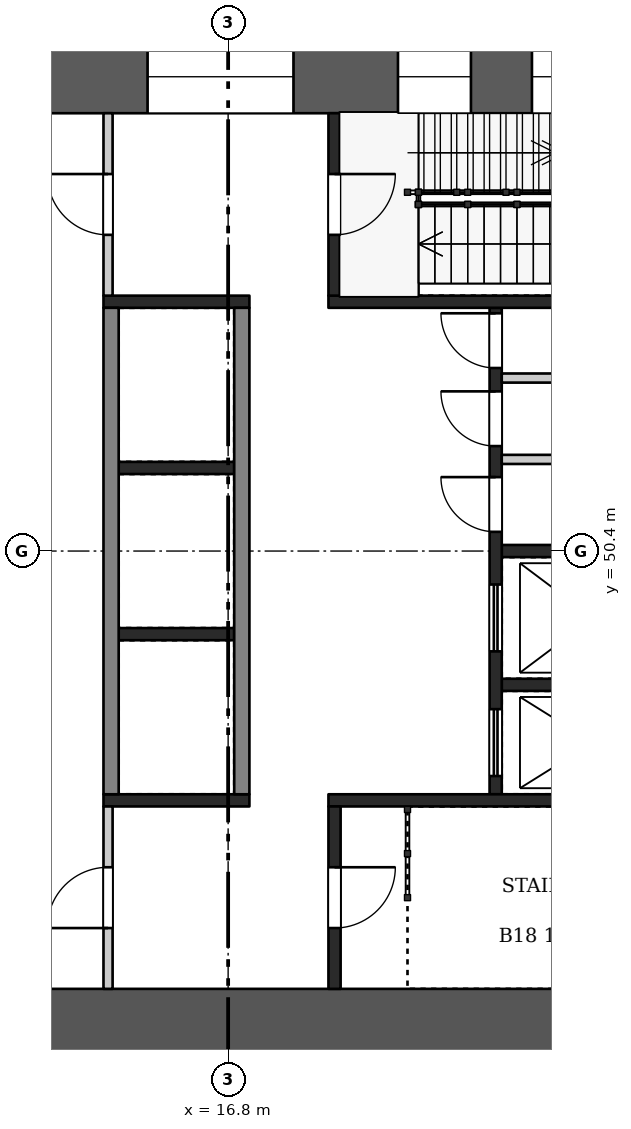
"""IFC4 building model, lengths in metres.
Left out: names, types, materials, properties, quantities, classifications, styles, units other than length and angle.
Written with IfcOpenShell. Run it as: python <this file> out.ifc"""

import sys

from ifc_helpers import new_model, si_unit, direction, frame, frame_2d, origin, place, context, subcontext, project, spatial, rectangle, extrude, element, fill, save


model = new_model("IFC4")
c1 = context("Model", 3, precision=1e-05, world=origin(), true_north=direction((0.0, 1.0)))
c2 = subcontext(c1, "Body", "Model", "MODEL_VIEW")
j1 = project(units=[si_unit("LENGTHUNIT", "METRE"), si_unit("PLANEANGLEUNIT", "RADIAN")], contexts=[c1])
p1 = place(None, origin())
s1 = spatial("IfcSite", under=j1, at=p1, CompositionType="ELEMENT")
p2 = place(p1, origin())
s2 = spatial("IfcBuilding", under=s1, at=p2, CompositionType="ELEMENT")
p3 = place(p2, frame((0.0, 0.0, 74.2)))
s3 = spatial("IfcBuildingStorey", under=s2, at=p3, CompositionType="ELEMENT", Elevation=74.2)
p4 = place(p3, frame((9.6, 58.2, 0.0), z_axis=(0.0, 0.0, 1.0), x_axis=(1.0, 0.0, 0.0)))
e1 = element("IfcWall", 1, at=p4, inside=s3, PredefinedType="SHEAR", context=c2, shape_type="SweptSolid", body=[
    extrude(rectangle(XDim=14.4, YDim=1.2, at=frame_2d((7.2, 0.0))), origin(), (0.0, 0.0, 1.0), 6.72),
])
p5 = place(p4, frame((1.105, 0.0, 0.6)))
e2 = element("IfcOpeningElement", 2, at=p5, cuts=e1, PredefinedType="OPENING", context=c2, shape_type="SweptSolid", body=[
    extrude(rectangle(XDim=3.0, YDim=2.1, at=frame_2d((1.5, 1.05))), frame((0.0, 0.61, 0.0), z_axis=(0.0, -1.0, 0.0), x_axis=(1.0, 0.0, 0.0)), (0.0, 0.0, 1.0), 1.22),
])
p6 = place(p4, frame((5.875, 0.0, 0.6)))
e3 = element("IfcOpeningElement", 3, at=p6, cuts=e1, PredefinedType="OPENING", context=c2, shape_type="SweptSolid", body=[
    extrude(rectangle(XDim=2.4, YDim=2.1, at=frame_2d((1.2, 1.05))), frame((0.0, 0.61, 0.0), z_axis=(0.0, -1.0, 0.0), x_axis=(1.0, 0.0, 0.0)), (0.0, 0.0, 1.0), 1.22),
])
p7 = place(p4, frame((9.993, 0.0, 0.5)))
e4 = element("IfcOpeningElement", 4, at=p7, cuts=e1, PredefinedType="OPENING", context=c2, shape_type="SweptSolid", body=[
    extrude(rectangle(XDim=1.2, YDim=2.4, at=frame_2d((0.6, 1.2))), frame((0.0, 0.61, 0.0), z_axis=(0.0, -1.0, 0.0), x_axis=(1.0, 0.0, 0.0)), (0.0, 0.0, 1.0), 1.22),
])
p8 = place(p4, frame((12.197, 0.0, 0.5)))
e5 = element("IfcOpeningElement", 5, at=p8, cuts=e1, PredefinedType="OPENING", context=c2, shape_type="SweptSolid", body=[
    extrude(rectangle(XDim=1.2, YDim=2.4, at=frame_2d((0.6, 1.2))), frame((0.0, 0.61, 0.0), z_axis=(0.0, -1.0, 0.0), x_axis=(1.0, 0.0, 0.0)), (0.0, 0.0, 1.0), 1.22),
])
p9 = place(p3, frame((9.6, 42.6, 0.0), z_axis=(0.0, 0.0, 1.0), x_axis=(1.0, 0.0, 0.0)))
e6 = element("IfcWall", 6, at=p9, inside=s3, PredefinedType="SHEAR", context=c2, shape_type="SweptSolid", body=[
    extrude(rectangle(XDim=14.4, YDim=1.2, at=frame_2d((7.2, 0.0))), origin(), (0.0, 0.0, 1.0), 6.72),
])
p10 = place(p9, frame((2.1, 0.0, 0.0)))
e7 = element("IfcOpeningElement", 7, at=p10, cuts=e6, PredefinedType="OPENING", context=c2, shape_type="SweptSolid", body=[
    extrude(rectangle(XDim=1.8, YDim=2.1, at=frame_2d((0.9, 1.05))), frame((0.0, 0.61, 0.0), z_axis=(0.0, -1.0, 0.0), x_axis=(1.0, 0.0, 0.0)), (0.0, 0.0, 1.0), 1.22),
])
for number, where, z_axis, x_axis in (
    (8, (15.0, 51.767, 0.0), (0.0, 0.0, 1.0), (1.0, 0.0, 0.0)),
    (9, (15.0, 49.033, 0.0), (0.0, 0.0, 1.0), (1.0, 0.0, 0.0)),
):
    element("IfcWall", number, at=place(p3, frame(where, z_axis=z_axis, x_axis=x_axis)), inside=s3, PredefinedType="SHEAR", context=c2, shape_type="SweptSolid", body=[
        extrude(rectangle(XDim=1.9, YDim=0.2, at=frame_2d((0.95, 0.0))), origin(), (0.0, 0.0, 1.0), 6.72),
    ])
for number, where, z_axis, x_axis in (
    (10, (14.875, 54.4, 0.0), (0.0, 0.0, 1.0), (0.0, -1.0, 0.0)),
    (11, (17.025, 54.4, 0.0), (0.0, 0.0, 1.0), (0.0, -1.0, 0.0)),
):
    element("IfcWall", number, at=place(p3, frame(where, z_axis=z_axis, x_axis=x_axis)), inside=s3, PredefinedType="SHEAR", context=c2, shape_type="SweptSolid", body=[
        extrude(rectangle(XDim=8.0, YDim=0.25, at=frame_2d((4.0, 0.0))), origin(), (0.0, 0.0, 1.0), 6.72),
    ])
for number, where, z_axis, x_axis in (
    (12, (21.3, 50.4, 0.0), (0.0, 0.0, 1.0), (1.0, 0.0, 0.0)),
    (13, (21.3, 48.2, 0.0), (0.0, 0.0, 1.0), (1.0, 0.0, 0.0)),
):
    element("IfcWall", number, at=place(p3, frame(where, z_axis=z_axis, x_axis=x_axis)), inside=s3, PredefinedType="SHEAR", context=c2, shape_type="SweptSolid", body=[
        extrude(rectangle(XDim=2.7, YDim=0.2, at=frame_2d((1.35, 0.0))), origin(), (0.0, 0.0, 1.0), 6.72),
    ])
for number, where, z_axis, x_axis in (
    (14, (21.3, 53.245, 0.0), (0.0, 0.0, 1.0), (1.0, 0.0, 0.0)),
    (15, (21.3, 51.907, 0.0), (0.0, 0.0, 1.0), (1.0, 0.0, 0.0)),
):
    element("IfcWall", number, at=place(p3, frame(where, z_axis=z_axis, x_axis=x_axis)), inside=s3, PredefinedType="PARTITIONING", context=c2, shape_type="SweptSolid", body=[
        extrude(rectangle(XDim=2.7, YDim=0.15, at=frame_2d((1.35, 0.0))), origin(), (0.0, 0.0, 1.0), 6.72),
    ])
p11 = place(p3, frame((21.2, 54.4, 0.0), z_axis=(0.0, 0.0, 1.0), x_axis=(0.0, -1.0, 0.0)))
e16 = element("IfcWall", 16, at=p11, inside=s3, PredefinedType="SHEAR", context=c2, shape_type="SweptSolid", body=[
    extrude(rectangle(XDim=8.0, YDim=0.2, at=frame_2d((4.0, 0.0))), origin(), (0.0, 0.0, 1.0), 6.72),
])
p12 = place(p11, frame((0.09, 0.0, 0.0)))
e17 = element("IfcOpeningElement", 17, at=p12, cuts=e16, PredefinedType="OPENING", context=c2, shape_type="SweptSolid", body=[
    extrude(rectangle(XDim=0.9, YDim=2.1, at=frame_2d((0.45, 1.05))), frame((0.0, 0.11, 0.0), z_axis=(0.0, -1.0, 0.0), x_axis=(1.0, 0.0, 0.0)), (0.0, 0.0, 1.0), 0.22),
])
p13 = place(p11, frame((1.374, 0.0, 0.0)))
e18 = element("IfcOpeningElement", 18, at=p13, cuts=e16, PredefinedType="OPENING", context=c2, shape_type="SweptSolid", body=[
    extrude(rectangle(XDim=0.9, YDim=2.1, at=frame_2d((0.45, 1.05))), frame((0.0, 0.11, 0.0), z_axis=(0.0, -1.0, 0.0), x_axis=(1.0, 0.0, 0.0)), (0.0, 0.0, 1.0), 0.22),
])
p14 = place(p11, frame((2.784, 0.0, 0.0)))
e19 = element("IfcOpeningElement", 19, at=p14, cuts=e16, PredefinedType="OPENING", context=c2, shape_type="SweptSolid", body=[
    extrude(rectangle(XDim=0.9, YDim=2.1, at=frame_2d((0.45, 1.05))), frame((0.0, 0.11, 0.0), z_axis=(0.0, -1.0, 0.0), x_axis=(1.0, 0.0, 0.0)), (0.0, 0.0, 1.0), 0.22),
])
p15 = place(p11, frame((4.55, 0.0, 0.0)))
e20 = element("IfcOpeningElement", 20, at=p15, cuts=e16, PredefinedType="OPENING", context=c2, shape_type="SweptSolid", body=[
    extrude(rectangle(XDim=1.1, YDim=2.1, at=frame_2d((0.55, 1.05))), frame((0.0, 0.11, 0.0), z_axis=(0.0, -1.0, 0.0), x_axis=(1.0, 0.0, 0.0)), (0.0, 0.0, 1.0), 0.22),
])
p16 = place(p11, frame((6.6, 0.0, 0.0)))
e21 = element("IfcOpeningElement", 21, at=p16, cuts=e16, PredefinedType="OPENING", context=c2, shape_type="SweptSolid", body=[
    extrude(rectangle(XDim=1.1, YDim=2.1, at=frame_2d((0.55, 1.05))), frame((0.0, 0.11, 0.0), z_axis=(0.0, -1.0, 0.0), x_axis=(1.0, 0.0, 0.0)), (0.0, 0.0, 1.0), 0.22),
])
p17 = place(p3, frame((14.75, 54.5, 0.0), z_axis=(0.0, 0.0, 1.0), x_axis=(1.0, 0.0, 0.0)))
e22 = element("IfcWall", 22, at=p17, inside=s3, PredefinedType="SHEAR", context=c2, shape_type="SweptSolid", body=[
    extrude(rectangle(XDim=2.4, YDim=0.2, at=frame_2d((1.2, 0.0))), origin(), (0.0, 0.0, 1.0), 6.72),
])
p18 = place(p3, frame((18.45, 54.5, 0.0), z_axis=(0.0, 0.0, 1.0), x_axis=(1.0, 0.0, 0.0)))
e23 = element("IfcWall", 23, at=p18, inside=s3, PredefinedType="SHEAR", context=c2, shape_type="SweptSolid", body=[
    extrude(rectangle(XDim=5.55, YDim=0.2, at=frame_2d((2.775, 0.0))), origin(), (0.0, 0.0, 1.0), 6.72),
])
p19 = place(p3, frame((14.825, 57.6, 0.0), z_axis=(0.0, 0.0, 1.0), x_axis=(0.0, -1.0, 0.0)))
e24 = element("IfcWall", 24, at=p19, inside=s3, PredefinedType="PARTITIONING", context=c2, shape_type="SweptSolid", body=[
    extrude(rectangle(XDim=3.0, YDim=0.15, at=frame_2d((1.5, 0.0))), origin(), (0.0, 0.0, 1.0), 6.72),
])
p20 = place(p19, frame((1.0, 0.0, 0.0)))
e25 = element("IfcOpeningElement", 25, at=p20, cuts=e24, PredefinedType="OPENING", context=c2, shape_type="SweptSolid", body=[
    extrude(rectangle(XDim=1.0, YDim=2.1, at=frame_2d((0.5, 1.05))), frame((0.0, 0.085, 0.0), z_axis=(0.0, -1.0, 0.0), x_axis=(1.0, 0.0, 0.0)), (0.0, 0.0, 1.0), 0.17),
])
p21 = place(p3, frame((18.55, 57.6, 0.0), z_axis=(0.0, 0.0, 1.0), x_axis=(0.0, -1.0, 0.0)))
e26 = element("IfcWall", 26, at=p21, inside=s3, PredefinedType="SHEAR", context=c2, shape_type="SweptSolid", body=[
    extrude(rectangle(XDim=3.0, YDim=0.2, at=frame_2d((1.5, 0.0))), origin(), (0.0, 0.0, 1.0), 6.72),
])
p22 = place(p21, frame((1.0, 0.0, 0.0)))
e27 = element("IfcOpeningElement", 27, at=p22, cuts=e26, PredefinedType="OPENING", context=c2, shape_type="SweptSolid", body=[
    extrude(rectangle(XDim=1.0, YDim=2.1, at=frame_2d((0.5, 1.05))), frame((0.0, 0.11, 0.0), z_axis=(0.0, -1.0, 0.0), x_axis=(1.0, 0.0, 0.0)), (0.0, 0.0, 1.0), 0.22),
])
p23 = place(p3, frame((14.75, 46.3, 0.0), z_axis=(0.0, 0.0, 1.0), x_axis=(1.0, 0.0, 0.0)))
e28 = element("IfcWall", 28, at=p23, inside=s3, PredefinedType="SHEAR", context=c2, shape_type="SweptSolid", body=[
    extrude(rectangle(XDim=2.4, YDim=0.2, at=frame_2d((1.2, 0.0))), origin(), (0.0, 0.0, 1.0), 6.72),
])
p24 = place(p3, frame((18.45, 46.3, 0.0), z_axis=(0.0, 0.0, 1.0), x_axis=(1.0, 0.0, 0.0)))
e29 = element("IfcWall", 29, at=p24, inside=s3, PredefinedType="SHEAR", context=c2, shape_type="SweptSolid", body=[
    extrude(rectangle(XDim=5.55, YDim=0.2, at=frame_2d((2.775, 0.0))), origin(), (0.0, 0.0, 1.0), 6.72),
])
p25 = place(p3, frame((14.825, 46.2, 0.0), z_axis=(0.0, 0.0, 1.0), x_axis=(0.0, -1.0, 0.0)))
e30 = element("IfcWall", 30, at=p25, inside=s3, PredefinedType="PARTITIONING", context=c2, shape_type="SweptSolid", body=[
    extrude(rectangle(XDim=3.0, YDim=0.15, at=frame_2d((1.5, 0.0))), origin(), (0.0, 0.0, 1.0), 6.72),
])
p26 = place(p25, frame((1.0, 0.0, 0.0)))
e31 = element("IfcOpeningElement", 31, at=p26, cuts=e30, PredefinedType="OPENING", context=c2, shape_type="SweptSolid", body=[
    extrude(rectangle(XDim=1.0, YDim=2.1, at=frame_2d((0.5, 1.05))), frame((0.0, 0.085, 0.0), z_axis=(0.0, -1.0, 0.0), x_axis=(1.0, 0.0, 0.0)), (0.0, 0.0, 1.0), 0.17),
])
p27 = place(p3, frame((18.55, 46.2, 0.0), z_axis=(0.0, 0.0, 1.0), x_axis=(0.0, -1.0, 0.0)))
e32 = element("IfcWall", 32, at=p27, inside=s3, PredefinedType="SHEAR", context=c2, shape_type="SweptSolid", body=[
    extrude(rectangle(XDim=3.0, YDim=0.2, at=frame_2d((1.5, 0.0))), origin(), (0.0, 0.0, 1.0), 6.72),
])
p28 = place(p27, frame((1.0, 0.0, 0.0)))
e33 = element("IfcOpeningElement", 33, at=p28, cuts=e32, PredefinedType="OPENING", context=c2, shape_type="SweptSolid", body=[
    extrude(rectangle(XDim=1.0, YDim=2.1, at=frame_2d((0.5, 1.05))), frame((0.0, 0.11, 0.0), z_axis=(0.0, -1.0, 0.0), x_axis=(1.0, 0.0, 0.0)), (0.0, 0.0, 1.0), 0.22),
])
p29 = place(p12, frame((0.9, 0.0, 0.0), z_axis=(0.0, 0.0, 1.0), x_axis=(-1.0, 0.0, 0.0)))
e34 = element("IfcDoor", 34, at=p29, inside=s3, OperationType="SINGLE_SWING_RIGHT", PredefinedType="DOOR", context=c2, shape_type="SweptSolid", body=[
    extrude(rectangle(XDim=0.9, YDim=2.1, at=frame_2d((0.45, 1.05))), frame((0.0, 0.025, 0.0), z_axis=(0.0, -1.0, 0.0), x_axis=(1.0, 0.0, 0.0)), (0.0, 0.0, 1.0), 0.05),
])
fill(e17, e34)
p30 = place(p13, frame((0.9, 0.0, 0.0), z_axis=(0.0, 0.0, 1.0), x_axis=(-1.0, 0.0, 0.0)))
e35 = element("IfcDoor", 35, at=p30, inside=s3, OperationType="SINGLE_SWING_RIGHT", PredefinedType="DOOR", context=c2, shape_type="SweptSolid", body=[
    extrude(rectangle(XDim=0.9, YDim=2.1, at=frame_2d((0.45, 1.05))), frame((0.0, 0.025, 0.0), z_axis=(0.0, -1.0, 0.0), x_axis=(1.0, 0.0, 0.0)), (0.0, 0.0, 1.0), 0.05),
])
fill(e18, e35)
p31 = place(p14, frame((0.9, 0.0, 0.0), z_axis=(0.0, 0.0, 1.0), x_axis=(-1.0, 0.0, 0.0)))
e36 = element("IfcDoor", 36, at=p31, inside=s3, OperationType="SINGLE_SWING_RIGHT", PredefinedType="DOOR", context=c2, shape_type="SweptSolid", body=[
    extrude(rectangle(XDim=0.9, YDim=2.1, at=frame_2d((0.45, 1.05))), frame((0.0, 0.025, 0.0), z_axis=(0.0, -1.0, 0.0), x_axis=(1.0, 0.0, 0.0)), (0.0, 0.0, 1.0), 0.05),
])
fill(e19, e36)
p32 = place(p15, origin())
e37 = element("IfcDoor", 37, at=p32, inside=s3, OperationType="DOUBLE_DOOR_SLIDING", PredefinedType="DOOR", context=c2, shape_type="SweptSolid", body=[
    extrude(rectangle(XDim=1.1, YDim=2.1, at=frame_2d((0.55, 1.05))), frame((0.0, 0.025, 0.0), z_axis=(0.0, -1.0, 0.0), x_axis=(1.0, 0.0, 0.0)), (0.0, 0.0, 1.0), 0.05),
])
fill(e20, e37)
p33 = place(p16, origin())
e38 = element("IfcDoor", 38, at=p33, inside=s3, OperationType="DOUBLE_DOOR_SLIDING", PredefinedType="DOOR", context=c2, shape_type="SweptSolid", body=[
    extrude(rectangle(XDim=1.1, YDim=2.1, at=frame_2d((0.55, 1.05))), frame((0.0, 0.025, 0.0), z_axis=(0.0, -1.0, 0.0), x_axis=(1.0, 0.0, 0.0)), (0.0, 0.0, 1.0), 0.05),
])
fill(e21, e38)
p34 = place(p20, frame((1.0, 0.0, 0.0), z_axis=(0.0, 0.0, 1.0), x_axis=(-1.0, 0.0, 0.0)))
e39 = element("IfcDoor", 39, at=p34, inside=s3, OperationType="SINGLE_SWING_RIGHT", PredefinedType="DOOR", context=c2, shape_type="SweptSolid", body=[
    extrude(rectangle(XDim=1.0, YDim=2.1, at=frame_2d((0.5, 1.05))), frame((0.0, 0.025, 0.0), z_axis=(0.0, -1.0, 0.0), x_axis=(1.0, 0.0, 0.0)), (0.0, 0.0, 1.0), 0.05),
])
fill(e25, e39)
p35 = place(p22, origin())
e40 = element("IfcDoor", 40, at=p35, inside=s3, OperationType="SINGLE_SWING_LEFT", PredefinedType="DOOR", context=c2, shape_type="SweptSolid", body=[
    extrude(rectangle(XDim=1.0, YDim=2.1, at=frame_2d((0.5, 1.05))), frame((0.0, 0.025, 0.0), z_axis=(0.0, -1.0, 0.0), x_axis=(1.0, 0.0, 0.0)), (0.0, 0.0, 1.0), 0.05),
])
fill(e27, e40)
p36 = place(p26, frame((1.0, 0.0, 0.0), z_axis=(0.0, 0.0, 1.0), x_axis=(-1.0, 0.0, 0.0)))
e41 = element("IfcDoor", 41, at=p36, inside=s3, OperationType="SINGLE_SWING_LEFT", PredefinedType="DOOR", context=c2, shape_type="SweptSolid", body=[
    extrude(rectangle(XDim=1.0, YDim=2.1, at=frame_2d((0.5, 1.05))), frame((0.0, 0.025, 0.0), z_axis=(0.0, -1.0, 0.0), x_axis=(1.0, 0.0, 0.0)), (0.0, 0.0, 1.0), 0.05),
])
fill(e31, e41)
p37 = place(p28, origin())
e42 = element("IfcDoor", 42, at=p37, inside=s3, OperationType="SINGLE_SWING_LEFT", PredefinedType="DOOR", context=c2, shape_type="SweptSolid", body=[
    extrude(rectangle(XDim=1.0, YDim=2.1, at=frame_2d((0.5, 1.05))), frame((0.0, 0.025, 0.0), z_axis=(0.0, -1.0, 0.0), x_axis=(1.0, 0.0, 0.0)), (0.0, 0.0, 1.0), 0.05),
])
fill(e33, e42)
p38 = place(p6, origin())
e43 = element("IfcWindow", 43, at=p38, inside=s3, PartitioningType="SINGLE_PANEL", PredefinedType="WINDOW", context=c2, shape_type="SweptSolid", body=[
    extrude(rectangle(XDim=2.4, YDim=2.1, at=frame_2d((1.2, 1.05))), frame((0.0, 0.03, 0.0), z_axis=(0.0, -1.0, 0.0), x_axis=(1.0, 0.0, 0.0)), (0.0, 0.0, 1.0), 0.06),
])
fill(e3, e43)
p39 = place(p7, origin())
e44 = element("IfcWindow", 44, at=p39, inside=s3, PartitioningType="SINGLE_PANEL", PredefinedType="WINDOW", context=c2, shape_type="SweptSolid", body=[
    extrude(rectangle(XDim=1.2, YDim=2.4, at=frame_2d((0.6, 1.2))), frame((0.0, 0.03, 0.0), z_axis=(0.0, -1.0, 0.0), x_axis=(1.0, 0.0, 0.0)), (0.0, 0.0, 1.0), 0.06),
])
fill(e4, e44)
p40 = place(p8, origin())
e45 = element("IfcWindow", 45, at=p40, inside=s3, PartitioningType="SINGLE_PANEL", PredefinedType="WINDOW", context=c2, shape_type="SweptSolid", body=[
    extrude(rectangle(XDim=1.2, YDim=2.4, at=frame_2d((0.6, 1.2))), frame((0.0, 0.03, 0.0), z_axis=(0.0, -1.0, 0.0), x_axis=(1.0, 0.0, 0.0)), (0.0, 0.0, 1.0), 0.06),
])
fill(e5, e45)
save(model, sys.argv[1])
